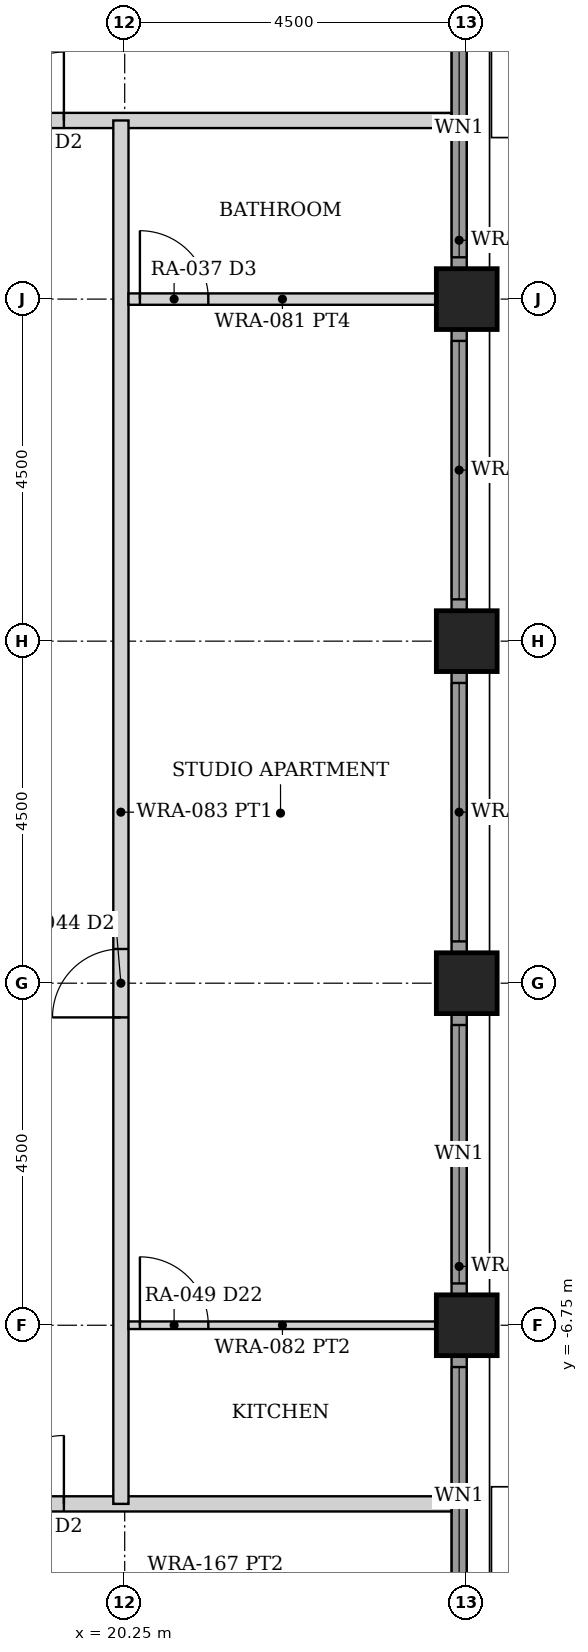
"""IFC4 building model, lengths in metres.
Left out: names, types, materials, properties, quantities, classifications, styles, units other than length and angle.
Written with IfcOpenShell. Run it as: python <this file> out.ifc"""

import sys

from ifc_helpers import new_model, si_unit, direction, frame, frame_2d, origin, origin_2d, place, context, subcontext, project, spatial, rectangle, hollow_rectangle, extrude, element, fill, save


model = new_model("IFC4")
c1 = context("Model", 3, precision=1e-05, world=origin(), true_north=direction((0.0, 1.0)))
c2 = subcontext(c1, "Body", "Model", "MODEL_VIEW")
j1 = project(units=[si_unit("LENGTHUNIT", "METRE"), si_unit("PLANEANGLEUNIT", "RADIAN")], contexts=[c1])
p1 = place(None, origin())
s1 = spatial("IfcSite", under=j1, at=p1, CompositionType="ELEMENT")
p2 = place(p1, origin())
s2 = spatial("IfcBuilding", under=s1, at=p2, CompositionType="ELEMENT")
p3 = place(p2, frame((0.0, 0.0, 26.5)))
s3 = spatial("IfcBuildingStorey", under=s2, at=p3, CompositionType="ELEMENT", Elevation=26.5)
for number, where, z_axis, x_axis in (
    (1, (24.75, -6.75, 0.0), (0.0, 0.0, 1.0), (1.0, 0.0, 0.0)),
    (2, (24.75, -2.25, 0.0), (0.0, 0.0, 1.0), (1.0, 0.0, 0.0)),
    (3, (24.75, 2.25, 0.0), (0.0, 0.0, 1.0), (1.0, 0.0, 0.0)),
    (4, (24.75, 6.75, 0.0), (0.0, 0.0, 1.0), (1.0, 0.0, 0.0)),
):
    element("IfcColumn", number, at=place(p3, frame(where, z_axis=z_axis, x_axis=x_axis)), inside=s3, PredefinedType="COLUMN", context=c2, shape_type="SweptSolid", body=[
        extrude(hollow_rectangle(XDim=0.8, YDim=0.8, WallThickness=0.08, at=origin_2d()), origin(), (0.0, 0.0, 1.0), 3.5),
    ])
p4 = place(p3, frame((24.65, -10.845, 0.0), z_axis=(0.0, 0.0, 1.0), x_axis=(0.0, 1.0, 0.0)))
e5 = element("IfcWall", 5, at=p4, inside=s3, PredefinedType="SOLIDWALL", context=c2, shape_type="SweptSolid", body=[
    extrude(rectangle(XDim=3.69, YDim=0.2, at=frame_2d((1.845, 0.0))), origin(), (0.0, 0.0, 1.0), 2.379),
])
p5 = place(p4, frame((0.145, 0.0, 0.3)))
e6 = element("IfcOpeningElement", 6, at=p5, cuts=e5, PredefinedType="OPENING", context=c2, shape_type="SweptSolid", body=[
    extrude(rectangle(XDim=3.4, YDim=1.929, at=frame_2d((1.7, 0.964))), frame((0.0, 0.11, 0.0), z_axis=(0.0, -1.0, 0.0), x_axis=(1.0, 0.0, 0.0)), (0.0, 0.0, 1.0), 0.22),
])
p6 = place(p3, frame((24.65, -6.345, 0.0), z_axis=(0.0, 0.0, 1.0), x_axis=(0.0, 1.0, 0.0)))
e7 = element("IfcWall", 7, at=p6, inside=s3, PredefinedType="SOLIDWALL", context=c2, shape_type="SweptSolid", body=[
    extrude(rectangle(XDim=3.69, YDim=0.2, at=frame_2d((1.845, 0.0))), origin(), (0.0, 0.0, 1.0), 2.379),
])
p7 = place(p6, frame((0.145, 0.0, 0.3)))
e8 = element("IfcOpeningElement", 8, at=p7, cuts=e7, PredefinedType="OPENING", context=c2, shape_type="SweptSolid", body=[
    extrude(rectangle(XDim=3.4, YDim=1.929, at=frame_2d((1.7, 0.964))), frame((0.0, 0.11, 0.0), z_axis=(0.0, -1.0, 0.0), x_axis=(1.0, 0.0, 0.0)), (0.0, 0.0, 1.0), 0.22),
])
p8 = place(p3, frame((24.65, -1.845, 0.0), z_axis=(0.0, 0.0, 1.0), x_axis=(0.0, 1.0, 0.0)))
e9 = element("IfcWall", 9, at=p8, inside=s3, PredefinedType="SOLIDWALL", context=c2, shape_type="SweptSolid", body=[
    extrude(rectangle(XDim=3.69, YDim=0.2, at=frame_2d((1.845, 0.0))), origin(), (0.0, 0.0, 1.0), 2.379),
])
p9 = place(p8, frame((0.145, 0.0, 0.3)))
e10 = element("IfcOpeningElement", 10, at=p9, cuts=e9, PredefinedType="OPENING", context=c2, shape_type="SweptSolid", body=[
    extrude(rectangle(XDim=3.4, YDim=1.929, at=frame_2d((1.7, 0.964))), frame((0.0, 0.11, 0.0), z_axis=(0.0, -1.0, 0.0), x_axis=(1.0, 0.0, 0.0)), (0.0, 0.0, 1.0), 0.22),
])
p10 = place(p3, frame((24.65, 2.655, 0.0), z_axis=(0.0, 0.0, 1.0), x_axis=(0.0, 1.0, 0.0)))
e11 = element("IfcWall", 11, at=p10, inside=s3, PredefinedType="SOLIDWALL", context=c2, shape_type="SweptSolid", body=[
    extrude(rectangle(XDim=3.69, YDim=0.2, at=frame_2d((1.845, 0.0))), origin(), (0.0, 0.0, 1.0), 2.379),
])
p11 = place(p10, frame((0.145, 0.0, 0.3)))
e12 = element("IfcOpeningElement", 12, at=p11, cuts=e11, PredefinedType="OPENING", context=c2, shape_type="SweptSolid", body=[
    extrude(rectangle(XDim=3.4, YDim=1.929, at=frame_2d((1.7, 0.964))), frame((0.0, 0.11, 0.0), z_axis=(0.0, -1.0, 0.0), x_axis=(1.0, 0.0, 0.0)), (0.0, 0.0, 1.0), 0.22),
])
p12 = place(p3, frame((24.65, 7.155, 0.0), z_axis=(0.0, 0.0, 1.0), x_axis=(0.0, 1.0, 0.0)))
e13 = element("IfcWall", 13, at=p12, inside=s3, PredefinedType="SOLIDWALL", context=c2, shape_type="SweptSolid", body=[
    extrude(rectangle(XDim=3.69, YDim=0.2, at=frame_2d((1.845, 0.0))), origin(), (0.0, 0.0, 1.0), 2.379),
])
p13 = place(p12, frame((0.145, 0.0, 0.3)))
e14 = element("IfcOpeningElement", 14, at=p13, cuts=e13, PredefinedType="OPENING", context=c2, shape_type="SweptSolid", body=[
    extrude(rectangle(XDim=3.4, YDim=1.929, at=frame_2d((1.7, 0.964))), frame((0.0, 0.11, 0.0), z_axis=(0.0, -1.0, 0.0), x_axis=(1.0, 0.0, 0.0)), (0.0, 0.0, 1.0), 0.22),
])
p14 = place(p3, frame((-24.55, 9.1, 0.0), z_axis=(0.0, 0.0, 1.0), x_axis=(1.0, 0.0, 0.0)))
e15 = element("IfcWall", 15, at=p14, inside=s3, PredefinedType="PARTITIONING", context=c2, shape_type="SweptSolid", body=[
    extrude(rectangle(XDim=49.1, YDim=0.2, at=frame_2d((24.55, 0.0))), origin(), (0.0, 0.0, 1.0), 2.373),
])
p15 = place(p14, frame((5.1, 0.0, 0.0)))
e16 = element("IfcOpeningElement", 16, at=p15, cuts=e15, PredefinedType="OPENING", context=c2, shape_type="SweptSolid", body=[
    extrude(rectangle(XDim=0.9, YDim=2.1, at=frame_2d((0.45, 1.05))), frame((0.0, 0.11, 0.0), z_axis=(0.0, -1.0, 0.0), x_axis=(1.0, 0.0, 0.0)), (0.0, 0.0, 1.0), 0.22),
])
p16 = place(p14, frame((9.0, 0.0, 0.0)))
e17 = element("IfcOpeningElement", 17, at=p16, cuts=e15, PredefinedType="OPENING", context=c2, shape_type="SweptSolid", body=[
    extrude(rectangle(XDim=0.9, YDim=2.1, at=frame_2d((0.45, 1.05))), frame((0.0, 0.11, 0.0), z_axis=(0.0, -1.0, 0.0), x_axis=(1.0, 0.0, 0.0)), (0.0, 0.0, 1.0), 0.22),
])
p17 = place(p14, frame((13.5, 0.0, 0.0)))
e18 = element("IfcOpeningElement", 18, at=p17, cuts=e15, PredefinedType="OPENING", context=c2, shape_type="SweptSolid", body=[
    extrude(rectangle(XDim=0.9, YDim=2.1, at=frame_2d((0.45, 1.05))), frame((0.0, 0.11, 0.0), z_axis=(0.0, -1.0, 0.0), x_axis=(1.0, 0.0, 0.0)), (0.0, 0.0, 1.0), 0.22),
])
p18 = place(p14, frame((18.0, 0.0, 0.0)))
e19 = element("IfcOpeningElement", 19, at=p18, cuts=e15, PredefinedType="OPENING", context=c2, shape_type="SweptSolid", body=[
    extrude(rectangle(XDim=0.9, YDim=2.1, at=frame_2d((0.45, 1.05))), frame((0.0, 0.11, 0.0), z_axis=(0.0, -1.0, 0.0), x_axis=(1.0, 0.0, 0.0)), (0.0, 0.0, 1.0), 0.22),
])
p19 = place(p14, frame((22.5, 0.0, 0.0)))
e20 = element("IfcOpeningElement", 20, at=p19, cuts=e15, PredefinedType="OPENING", context=c2, shape_type="SweptSolid", body=[
    extrude(rectangle(XDim=0.9, YDim=2.1, at=frame_2d((0.45, 1.05))), frame((0.0, 0.11, 0.0), z_axis=(0.0, -1.0, 0.0), x_axis=(1.0, 0.0, 0.0)), (0.0, 0.0, 1.0), 0.22),
])
p20 = place(p14, frame((27.0, 0.0, 0.0)))
e21 = element("IfcOpeningElement", 21, at=p20, cuts=e15, PredefinedType="OPENING", context=c2, shape_type="SweptSolid", body=[
    extrude(rectangle(XDim=0.9, YDim=2.1, at=frame_2d((0.45, 1.05))), frame((0.0, 0.11, 0.0), z_axis=(0.0, -1.0, 0.0), x_axis=(1.0, 0.0, 0.0)), (0.0, 0.0, 1.0), 0.22),
])
p21 = place(p14, frame((31.5, 0.0, 0.0)))
e22 = element("IfcOpeningElement", 22, at=p21, cuts=e15, PredefinedType="OPENING", context=c2, shape_type="SweptSolid", body=[
    extrude(rectangle(XDim=0.9, YDim=2.1, at=frame_2d((0.45, 1.05))), frame((0.0, 0.11, 0.0), z_axis=(0.0, -1.0, 0.0), x_axis=(1.0, 0.0, 0.0)), (0.0, 0.0, 1.0), 0.22),
])
p22 = place(p14, frame((36.0, 0.0, 0.0)))
e23 = element("IfcOpeningElement", 23, at=p22, cuts=e15, PredefinedType="OPENING", context=c2, shape_type="SweptSolid", body=[
    extrude(rectangle(XDim=0.9, YDim=2.1, at=frame_2d((0.45, 1.05))), frame((0.0, 0.11, 0.0), z_axis=(0.0, -1.0, 0.0), x_axis=(1.0, 0.0, 0.0)), (0.0, 0.0, 1.0), 0.22),
])
p23 = place(p14, frame((43.1, 0.0, 0.0)))
e24 = element("IfcOpeningElement", 24, at=p23, cuts=e15, PredefinedType="OPENING", context=c2, shape_type="SweptSolid", body=[
    extrude(rectangle(XDim=0.9, YDim=2.1, at=frame_2d((0.45, 1.05))), frame((0.0, 0.11, 0.0), z_axis=(0.0, -1.0, 0.0), x_axis=(1.0, 0.0, 0.0)), (0.0, 0.0, 1.0), 0.22),
])
p24 = place(p3, frame((-24.55, -9.1, 0.0), z_axis=(0.0, 0.0, 1.0), x_axis=(1.0, 0.0, 0.0)))
e25 = element("IfcWall", 25, at=p24, inside=s3, PredefinedType="PARTITIONING", context=c2, shape_type="SweptSolid", body=[
    extrude(rectangle(XDim=49.1, YDim=0.2, at=frame_2d((24.55, 0.0))), origin(), (0.0, 0.0, 1.0), 2.373),
])
p25 = place(p24, frame((5.1, 0.0, 0.0)))
e26 = element("IfcOpeningElement", 26, at=p25, cuts=e25, PredefinedType="OPENING", context=c2, shape_type="SweptSolid", body=[
    extrude(rectangle(XDim=0.9, YDim=2.1, at=frame_2d((0.45, 1.05))), frame((0.0, 0.11, 0.0), z_axis=(0.0, -1.0, 0.0), x_axis=(1.0, 0.0, 0.0)), (0.0, 0.0, 1.0), 0.22),
])
p26 = place(p24, frame((9.0, 0.0, 0.0)))
e27 = element("IfcOpeningElement", 27, at=p26, cuts=e25, PredefinedType="OPENING", context=c2, shape_type="SweptSolid", body=[
    extrude(rectangle(XDim=0.9, YDim=2.1, at=frame_2d((0.45, 1.05))), frame((0.0, 0.11, 0.0), z_axis=(0.0, -1.0, 0.0), x_axis=(1.0, 0.0, 0.0)), (0.0, 0.0, 1.0), 0.22),
])
p27 = place(p24, frame((13.5, 0.0, 0.0)))
e28 = element("IfcOpeningElement", 28, at=p27, cuts=e25, PredefinedType="OPENING", context=c2, shape_type="SweptSolid", body=[
    extrude(rectangle(XDim=0.9, YDim=2.1, at=frame_2d((0.45, 1.05))), frame((0.0, 0.11, 0.0), z_axis=(0.0, -1.0, 0.0), x_axis=(1.0, 0.0, 0.0)), (0.0, 0.0, 1.0), 0.22),
])
p28 = place(p24, frame((18.0, 0.0, 0.0)))
e29 = element("IfcOpeningElement", 29, at=p28, cuts=e25, PredefinedType="OPENING", context=c2, shape_type="SweptSolid", body=[
    extrude(rectangle(XDim=0.9, YDim=2.1, at=frame_2d((0.45, 1.05))), frame((0.0, 0.11, 0.0), z_axis=(0.0, -1.0, 0.0), x_axis=(1.0, 0.0, 0.0)), (0.0, 0.0, 1.0), 0.22),
])
p29 = place(p24, frame((22.5, 0.0, 0.0)))
e30 = element("IfcOpeningElement", 30, at=p29, cuts=e25, PredefinedType="OPENING", context=c2, shape_type="SweptSolid", body=[
    extrude(rectangle(XDim=0.9, YDim=2.1, at=frame_2d((0.45, 1.05))), frame((0.0, 0.11, 0.0), z_axis=(0.0, -1.0, 0.0), x_axis=(1.0, 0.0, 0.0)), (0.0, 0.0, 1.0), 0.22),
])
p30 = place(p24, frame((27.0, 0.0, 0.0)))
e31 = element("IfcOpeningElement", 31, at=p30, cuts=e25, PredefinedType="OPENING", context=c2, shape_type="SweptSolid", body=[
    extrude(rectangle(XDim=0.9, YDim=2.1, at=frame_2d((0.45, 1.05))), frame((0.0, 0.11, 0.0), z_axis=(0.0, -1.0, 0.0), x_axis=(1.0, 0.0, 0.0)), (0.0, 0.0, 1.0), 0.22),
])
p31 = place(p24, frame((31.5, 0.0, 0.0)))
e32 = element("IfcOpeningElement", 32, at=p31, cuts=e25, PredefinedType="OPENING", context=c2, shape_type="SweptSolid", body=[
    extrude(rectangle(XDim=0.9, YDim=2.1, at=frame_2d((0.45, 1.05))), frame((0.0, 0.11, 0.0), z_axis=(0.0, -1.0, 0.0), x_axis=(1.0, 0.0, 0.0)), (0.0, 0.0, 1.0), 0.22),
])
p32 = place(p24, frame((36.0, 0.0, 0.0)))
e33 = element("IfcOpeningElement", 33, at=p32, cuts=e25, PredefinedType="OPENING", context=c2, shape_type="SweptSolid", body=[
    extrude(rectangle(XDim=0.9, YDim=2.1, at=frame_2d((0.45, 1.05))), frame((0.0, 0.11, 0.0), z_axis=(0.0, -1.0, 0.0), x_axis=(1.0, 0.0, 0.0)), (0.0, 0.0, 1.0), 0.22),
])
p33 = place(p24, frame((43.1, 0.0, 0.0)))
e34 = element("IfcOpeningElement", 34, at=p33, cuts=e25, PredefinedType="OPENING", context=c2, shape_type="SweptSolid", body=[
    extrude(rectangle(XDim=0.9, YDim=2.1, at=frame_2d((0.45, 1.05))), frame((0.0, 0.11, 0.0), z_axis=(0.0, -1.0, 0.0), x_axis=(1.0, 0.0, 0.0)), (0.0, 0.0, 1.0), 0.22),
])
p34 = place(p3, frame((20.2, -9.1, 0.0), z_axis=(0.0, 0.0, 1.0), x_axis=(0.0, 1.0, 0.0)))
e35 = element("IfcWall", 35, at=p34, inside=s3, PredefinedType="PARTITIONING", context=c2, shape_type="SweptSolid", body=[
    extrude(rectangle(XDim=18.2, YDim=0.2, at=frame_2d((9.1, 0.0))), origin(), (0.0, 0.0, 1.0), 2.373),
])
p35 = place(p34, frame((6.4, 0.0, 0.0)))
e36 = element("IfcOpeningElement", 36, at=p35, cuts=e35, PredefinedType="OPENING", context=c2, shape_type="SweptSolid", body=[
    extrude(rectangle(XDim=0.9, YDim=2.1, at=frame_2d((0.45, 1.05))), frame((0.0, 0.11, 0.0), z_axis=(0.0, -1.0, 0.0), x_axis=(1.0, 0.0, 0.0)), (0.0, 0.0, 1.0), 0.22),
])
p36 = place(p3, frame((20.3, -6.75, 0.0), z_axis=(0.0, 0.0, 1.0), x_axis=(1.0, 0.0, 0.0)))
e37 = element("IfcWall", 37, at=p36, inside=s3, PredefinedType="PARTITIONING", context=c2, shape_type="SweptSolid", body=[
    extrude(rectangle(XDim=4.05, YDim=0.1, at=frame_2d((2.025, 0.0))), origin(), (0.0, 0.0, 1.0), 2.373),
])
p37 = place(p36, frame((0.15, 0.0, 0.0)))
e38 = element("IfcOpeningElement", 38, at=p37, cuts=e37, PredefinedType="OPENING", context=c2, shape_type="SweptSolid", body=[
    extrude(rectangle(XDim=0.9, YDim=2.1, at=frame_2d((0.45, 1.05))), frame((0.0, 0.06, 0.0), z_axis=(0.0, -1.0, 0.0), x_axis=(1.0, 0.0, 0.0)), (0.0, 0.0, 1.0), 0.12),
])
p38 = place(p3, frame((20.3, 6.75, 0.0), z_axis=(0.0, 0.0, 1.0), x_axis=(1.0, 0.0, 0.0)))
e39 = element("IfcWall", 39, at=p38, inside=s3, PredefinedType="PARTITIONING", context=c2, shape_type="SweptSolid", body=[
    extrude(rectangle(XDim=4.05, YDim=0.15, at=frame_2d((2.025, 0.0))), origin(), (0.0, 0.0, 1.0), 2.373),
])
p39 = place(p38, frame((0.15, 0.0, 0.0)))
e40 = element("IfcOpeningElement", 40, at=p39, cuts=e39, PredefinedType="OPENING", context=c2, shape_type="SweptSolid", body=[
    extrude(rectangle(XDim=0.9, YDim=2.1, at=frame_2d((0.45, 1.05))), frame((0.0, 0.085, 0.0), z_axis=(0.0, -1.0, 0.0), x_axis=(1.0, 0.0, 0.0)), (0.0, 0.0, 1.0), 0.17),
])
p40 = place(p5, origin())
e41 = element("IfcWindow", 41, at=p40, inside=s3, PartitioningType="SINGLE_PANEL", PredefinedType="WINDOW", context=c2, shape_type="SweptSolid", body=[
    extrude(rectangle(XDim=3.4, YDim=1.929, at=frame_2d((1.7, 0.964))), frame((0.0, 0.03, 0.0), z_axis=(0.0, -1.0, 0.0), x_axis=(1.0, 0.0, 0.0)), (0.0, 0.0, 1.0), 0.06),
])
fill(e6, e41)
p41 = place(p7, origin())
e42 = element("IfcWindow", 42, at=p41, inside=s3, PartitioningType="SINGLE_PANEL", PredefinedType="WINDOW", context=c2, shape_type="SweptSolid", body=[
    extrude(rectangle(XDim=3.4, YDim=1.929, at=frame_2d((1.7, 0.964))), frame((0.0, 0.03, 0.0), z_axis=(0.0, -1.0, 0.0), x_axis=(1.0, 0.0, 0.0)), (0.0, 0.0, 1.0), 0.06),
])
fill(e8, e42)
p42 = place(p9, origin())
e43 = element("IfcWindow", 43, at=p42, inside=s3, PartitioningType="SINGLE_PANEL", PredefinedType="WINDOW", context=c2, shape_type="SweptSolid", body=[
    extrude(rectangle(XDim=3.4, YDim=1.929, at=frame_2d((1.7, 0.964))), frame((0.0, 0.03, 0.0), z_axis=(0.0, -1.0, 0.0), x_axis=(1.0, 0.0, 0.0)), (0.0, 0.0, 1.0), 0.06),
])
fill(e10, e43)
p43 = place(p11, origin())
e44 = element("IfcWindow", 44, at=p43, inside=s3, PartitioningType="SINGLE_PANEL", PredefinedType="WINDOW", context=c2, shape_type="SweptSolid", body=[
    extrude(rectangle(XDim=3.4, YDim=1.929, at=frame_2d((1.7, 0.964))), frame((0.0, 0.03, 0.0), z_axis=(0.0, -1.0, 0.0), x_axis=(1.0, 0.0, 0.0)), (0.0, 0.0, 1.0), 0.06),
])
fill(e12, e44)
p44 = place(p13, origin())
e45 = element("IfcWindow", 45, at=p44, inside=s3, PartitioningType="SINGLE_PANEL", PredefinedType="WINDOW", context=c2, shape_type="SweptSolid", body=[
    extrude(rectangle(XDim=3.4, YDim=1.929, at=frame_2d((1.7, 0.964))), frame((0.0, 0.03, 0.0), z_axis=(0.0, -1.0, 0.0), x_axis=(1.0, 0.0, 0.0)), (0.0, 0.0, 1.0), 0.06),
])
fill(e14, e45)
p45 = place(p23, origin())
e46 = element("IfcDoor", 46, at=p45, inside=s3, OperationType="SINGLE_SWING_RIGHT", PredefinedType="DOOR", context=c2, shape_type="SweptSolid", body=[
    extrude(rectangle(XDim=0.9, YDim=2.1, at=frame_2d((0.45, 1.05))), frame((0.0, 0.025, 0.0), z_axis=(0.0, -1.0, 0.0), x_axis=(1.0, 0.0, 0.0)), (0.0, 0.0, 1.0), 0.05),
])
fill(e24, e46)
p46 = place(p33, origin())
e47 = element("IfcDoor", 47, at=p46, inside=s3, OperationType="SINGLE_SWING_RIGHT", PredefinedType="DOOR", context=c2, shape_type="SweptSolid", body=[
    extrude(rectangle(XDim=0.9, YDim=2.1, at=frame_2d((0.45, 1.05))), frame((0.0, 0.025, 0.0), z_axis=(0.0, -1.0, 0.0), x_axis=(1.0, 0.0, 0.0)), (0.0, 0.0, 1.0), 0.05),
])
fill(e34, e47)
p47 = place(p37, origin())
e48 = element("IfcDoor", 48, at=p47, inside=s3, OperationType="SINGLE_SWING_LEFT", PredefinedType="DOOR", context=c2, shape_type="SweptSolid", body=[
    extrude(rectangle(XDim=0.9, YDim=2.1, at=frame_2d((0.45, 1.05))), frame((0.0, 0.025, 0.0), z_axis=(0.0, -1.0, 0.0), x_axis=(1.0, 0.0, 0.0)), (0.0, 0.0, 1.0), 0.05),
])
fill(e38, e48)
p48 = place(p39, origin())
e49 = element("IfcDoor", 49, at=p48, inside=s3, OperationType="SINGLE_SWING_LEFT", PredefinedType="DOOR", context=c2, shape_type="SweptSolid", body=[
    extrude(rectangle(XDim=0.9, YDim=2.1, at=frame_2d((0.45, 1.05))), frame((0.0, 0.025, 0.0), z_axis=(0.0, -1.0, 0.0), x_axis=(1.0, 0.0, 0.0)), (0.0, 0.0, 1.0), 0.05),
])
fill(e40, e49)
p49 = place(p35, origin())
e50 = element("IfcDoor", 50, at=p49, inside=s3, OperationType="SINGLE_SWING_LEFT", PredefinedType="DOOR", context=c2, shape_type="SweptSolid", body=[
    extrude(rectangle(XDim=0.9, YDim=2.1, at=frame_2d((0.45, 1.05))), frame((0.0, 0.025, 0.0), z_axis=(0.0, -1.0, 0.0), x_axis=(1.0, 0.0, 0.0)), (0.0, 0.0, 1.0), 0.05),
])
fill(e36, e50)
save(model, sys.argv[1])
